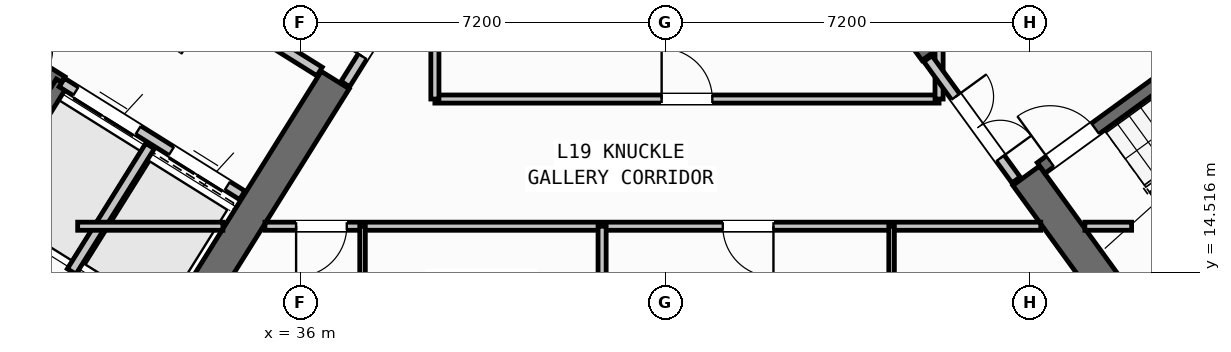
"""IFC4 building model, lengths in metres.
Left out: names, types, materials, properties, quantities, classifications, styles, units other than length and angle.
Written with IfcOpenShell. Run it as: python <this file> out.ifc"""

import sys

from ifc_helpers import new_model, si_unit, direction, frame, frame_2d, origin, place, context, subcontext, project, spatial, rectangle, extrude, source, transform, mapped, element, fill, save


model = new_model("IFC4")
c1 = context("Model", 3, precision=1e-05, world=origin(), true_north=direction((0.0, 1.0)))
c2 = subcontext(c1, "Body", "Model", "MODEL_VIEW")
j1 = project(units=[si_unit("LENGTHUNIT", "METRE"), si_unit("PLANEANGLEUNIT", "RADIAN")], contexts=[c1])
p1 = place(None, origin())
s1 = spatial("IfcSite", under=j1, at=p1, CompositionType="ELEMENT")
p2 = place(p1, origin())
s2 = spatial("IfcBuilding", under=s1, at=p2, CompositionType="ELEMENT")
p3 = place(p2, frame((0.0, 0.0, 76.5)))
s3 = spatial("IfcBuildingStorey", under=s2, at=p3, CompositionType="ELEMENT", Elevation=76.5)
p4 = place(p3, frame((33.409, 12.45, 0.0), z_axis=(0.0, 0.0, 1.0), x_axis=(-0.848051132073, 0.529914405721, 0.0)))
e1 = element("IfcWall", 1, at=p4, inside=s3, PredefinedType="SHEAR", context=c2, shape_type="SweptSolid", body=[
    extrude(rectangle(XDim=13.24, YDim=0.65, at=frame_2d((6.62, 0.0))), origin(), (0.0, 0.0, 1.0), 4.25),
])
p5 = place(p3, frame((36.683, 18.304, 0.0), z_axis=(0.0, 0.0, 1.0), x_axis=(-0.529899109053, -0.848060690178, 0.0)))
e2 = element("IfcWall", 2, at=p5, inside=s3, PredefinedType="SHEAR", context=c2, shape_type="SweptSolid", body=[
    extrude(rectangle(XDim=6.375, YDim=0.65, at=frame_2d((3.188, 0.0))), origin(), (0.0, 0.0, 1.0), 4.25),
])
p6 = place(p3, frame((52.318, 13.11, 0.0), z_axis=(0.0, 0.0, 1.0), x_axis=(0.809019445368, 0.587781878776, 0.0)))
e3 = element("IfcWall", 3, at=p6, inside=s3, PredefinedType="SHEAR", context=c2, shape_type="SweptSolid", body=[
    extrude(rectangle(XDim=12.44, YDim=0.65, at=frame_2d((6.22, 0.0))), origin(), (0.0, 0.0, 1.0), 4.25),
])
p7 = place(p3, frame((52.39, 13.564, 0.0), z_axis=(0.0, 0.0, 1.0), x_axis=(-0.58779688989, 0.809008539037, 0.0)))
e4 = element("IfcWall", 4, at=p7, inside=s3, PredefinedType="SHEAR", context=c2, shape_type="SweptSolid", body=[
    extrude(rectangle(XDim=3.525, YDim=0.65, at=frame_2d((1.763, 0.0))), origin(), (0.0, 0.0, 1.0), 4.25),
])
p8 = place(p3, frame((48.526, 18.884, 0.0), z_axis=(0.0, 0.0, 1.0), x_axis=(-0.58777996584, 0.809020835181, 0.0)))
e5 = element("IfcWall", 5, at=p8, inside=s3, PredefinedType="SHEAR", context=c2, shape_type="SweptSolid", body=[
    extrude(rectangle(XDim=6.375, YDim=0.65, at=frame_2d((3.188, 0.0))), origin(), (0.0, 0.0, 1.0), 4.25),
])
p9 = place(p3, frame((31.76, 12.183, 0.0), z_axis=(0.0, 0.0, 1.0), x_axis=(-0.848047074256, 0.529920899612, 0.0)))
e6 = element("IfcWall", 6, at=p9, inside=s3, PredefinedType="STANDARD", context=c2, shape_type="SweptSolid", body=[
    extrude(rectangle(XDim=30.652, YDim=0.32, at=frame_2d((15.326, 0.0))), origin(), (0.0, 0.0, 1.0), 4.25),
])
p10 = place(p9, frame((14.878, 0.0, 0.0)))
e7 = element("IfcOpeningElement", 7, at=p10, cuts=e6, PredefinedType="OPENING", context=c2, shape_type="SweptSolid", body=[
    extrude(rectangle(XDim=1.2, YDim=2.15, at=frame_2d((0.6, 1.075))), frame((0.0, 0.17, 0.0), z_axis=(0.0, -1.0, 0.0), x_axis=(1.0, 0.0, 0.0)), (0.0, 0.0, 1.0), 0.34),
])
p11 = place(p9, frame((1.74, 0.0, 0.7)))
e8 = element("IfcOpeningElement", 8, at=p11, cuts=e6, PredefinedType="OPENING", context=c2, shape_type="SweptSolid", body=[
    extrude(rectangle(XDim=2.6, YDim=2.0, at=frame_2d((1.3, 1.0))), frame((0.0, 0.17, 0.0), z_axis=(0.0, -1.0, 0.0), x_axis=(1.0, 0.0, 0.0)), (0.0, 0.0, 1.0), 0.34),
])
p12 = place(p9, frame((6.919, 0.0, 0.7)))
e9 = element("IfcOpeningElement", 9, at=p12, cuts=e6, PredefinedType="OPENING", context=c2, shape_type="SweptSolid", body=[
    extrude(rectangle(XDim=2.6, YDim=2.0, at=frame_2d((1.3, 1.0))), frame((0.0, 0.17, 0.0), z_axis=(0.0, -1.0, 0.0), x_axis=(1.0, 0.0, 0.0)), (0.0, 0.0, 1.0), 0.34),
])
p13 = place(p9, frame((19.451, 0.0, 0.85)))
e10 = element("IfcOpeningElement", 10, at=p13, cuts=e6, PredefinedType="OPENING", context=c2, shape_type="SweptSolid", body=[
    extrude(rectangle(XDim=1.6, YDim=1.8, at=frame_2d((0.8, 0.9))), frame((0.0, 0.17, 0.0), z_axis=(0.0, -1.0, 0.0), x_axis=(1.0, 0.0, 0.0)), (0.0, 0.0, 1.0), 0.34),
])
p14 = place(p9, frame((26.358, 0.0, 0.7)))
e11 = element("IfcOpeningElement", 11, at=p14, cuts=e6, PredefinedType="OPENING", context=c2, shape_type="SweptSolid", body=[
    extrude(rectangle(XDim=2.6, YDim=2.0, at=frame_2d((1.3, 1.0))), frame((0.0, 0.17, 0.0), z_axis=(0.0, -1.0, 0.0), x_axis=(1.0, 0.0, 0.0)), (0.0, 0.0, 1.0), 0.34),
])
p15 = place(p3, frame((31.28, 18.261, 0.0), z_axis=(0.0, 0.0, 1.0), x_axis=(-0.848051618787, 0.529913626805, 0.0)))
e12 = element("IfcWall", 12, at=p15, inside=s3, PredefinedType="SHEAR", context=c2, shape_type="SweptSolid", body=[
    extrude(rectangle(XDim=7.46, YDim=0.26, at=frame_2d((3.73, 0.0))), origin(), (0.0, 0.0, 1.0), 4.25),
])
p16 = place(p15, frame((0.36, 0.0, 0.0)))
e13 = element("IfcOpeningElement", 13, at=p16, cuts=e12, PredefinedType="OPENING", context=c2, shape_type="SweptSolid", body=[
    extrude(rectangle(XDim=0.86, YDim=2.05, at=frame_2d((0.43, 1.025))), frame((0.0, 0.14, 0.0), z_axis=(0.0, -1.0, 0.0), x_axis=(1.0, 0.0, 0.0)), (0.0, 0.0, 1.0), 0.28),
])
p17 = place(p3, frame((31.288, 18.256, 0.0), z_axis=(0.0, 0.0, 1.0), x_axis=(-0.529943379326, -0.848033026897, 0.0)))
e14 = element("IfcWall", 14, at=p17, inside=s3, PredefinedType="SHEAR", context=c2, shape_type="SweptSolid", body=[
    extrude(rectangle(XDim=3.16, YDim=0.26, at=frame_2d((1.58, 0.0))), origin(), (0.0, 0.0, 1.0), 4.25),
])
p18 = place(p3, frame((34.848, 16.031, 0.0), z_axis=(0.0, 0.0, 1.0), x_axis=(-0.848044042236, 0.529925751807, 0.0)))
e15 = element("IfcWall", 15, at=p18, inside=s3, PredefinedType="STANDARD", context=c2, shape_type="SweptSolid", body=[
    extrude(rectangle(XDim=4.198, YDim=0.2, at=frame_2d((2.099, 0.0))), origin(), (0.0, 0.0, 1.0), 4.24),
])
p19 = place(p18, frame((0.348, 0.0, 0.0)))
e16 = element("IfcOpeningElement", 16, at=p19, cuts=e15, PredefinedType="OPENING", context=c2, shape_type="SweptSolid", body=[
    extrude(rectangle(XDim=1.3, YDim=2.2, at=frame_2d((0.65, 1.1))), frame((0.0, 0.11, 0.0), z_axis=(0.0, -1.0, 0.0), x_axis=(1.0, 0.0, 0.0)), (0.0, 0.0, 1.0), 0.22),
])
p20 = place(p18, frame((2.423, 0.0, 0.0)))
e17 = element("IfcOpeningElement", 17, at=p20, cuts=e15, PredefinedType="OPENING", context=c2, shape_type="SweptSolid", body=[
    extrude(rectangle(XDim=1.45, YDim=2.25, at=frame_2d((0.725, 1.125))), frame((0.0, 0.11, 0.0), z_axis=(0.0, -1.0, 0.0), x_axis=(1.0, 0.0, 0.0)), (0.0, 0.0, 1.0), 0.22),
])
p21 = place(p3, frame((36.374, 18.474, 0.0), z_axis=(0.0, 0.0, 1.0), x_axis=(-0.848051071577, 0.529914502535, 0.0)))
e18 = element("IfcWall", 18, at=p21, inside=s3, PredefinedType="STANDARD", context=c2, shape_type="SweptSolid", body=[
    extrude(rectangle(XDim=5.718, YDim=0.2, at=frame_2d((2.859, 0.0))), origin(), (0.0, 0.0, 1.0), 4.24),
])
p22 = place(p21, frame((2.498, 0.0, 0.0)))
e19 = element("IfcOpeningElement", 19, at=p22, cuts=e18, PredefinedType="OPENING", context=c2, shape_type="SweptSolid", body=[
    extrude(rectangle(XDim=1.15, YDim=2.1, at=frame_2d((0.575, 1.05))), frame((0.0, 0.11, 0.0), z_axis=(0.0, -1.0, 0.0), x_axis=(1.0, 0.0, 0.0)), (0.0, 0.0, 1.0), 0.22),
])
p23 = place(p3, frame((33.029, 17.003, 0.0), z_axis=(0.0, 0.0, 1.0), x_axis=(-0.529916267533, -0.848049968695, 0.0)))
e20 = element("IfcWall", 20, at=p23, inside=s3, PredefinedType="STANDARD", context=c2, shape_type="SweptSolid", body=[
    extrude(rectangle(XDim=2.92, YDim=0.2, at=frame_2d((1.46, 0.0))), origin(), (0.0, 0.0, 1.0), 4.24),
])
p24 = place(p3, frame((52.472, 14.013, 0.0), z_axis=(0.0, 0.0, 1.0), x_axis=(0.809028366311, 0.587769599847, 0.0)))
e21 = element("IfcWall", 21, at=p24, inside=s3, PredefinedType="SHEAR", context=c2, shape_type="SweptSolid", body=[
    extrude(rectangle(XDim=7.33, YDim=0.26, at=frame_2d((3.665, 0.0))), origin(), (0.0, 0.0, 1.0), 4.25),
])
p25 = place(p3, frame((50.615, 16.57, 0.0), z_axis=(0.0, 0.0, 1.0), x_axis=(0.809028366311, 0.587769599847, 0.0)))
e22 = element("IfcWall", 22, at=p25, inside=s3, PredefinedType="SHEAR", context=c2, shape_type="SweptSolid", body=[
    extrude(rectangle(XDim=7.33, YDim=0.26, at=frame_2d((3.665, 0.0))), origin(), (0.0, 0.0, 1.0), 4.25),
])
p26 = place(p25, frame((0.22, 0.0, 0.0)))
e23 = element("IfcOpeningElement", 23, at=p26, cuts=e22, PredefinedType="OPENING", context=c2, shape_type="SweptSolid", body=[
    extrude(rectangle(XDim=1.1, YDim=2.1, at=frame_2d((0.55, 1.05))), frame((0.0, 0.14, 0.0), z_axis=(0.0, -1.0, 0.0), x_axis=(1.0, 0.0, 0.0)), (0.0, 0.0, 1.0), 0.28),
])
p27 = place(p3, frame((38.451, 20.737, 0.0), z_axis=(0.0, 0.0, 1.0), x_axis=(-0.529924799939, -0.848044637038, 0.0)))
e24 = element("IfcWall", 24, at=p27, inside=s3, PredefinedType="STANDARD", context=c2, shape_type="SweptSolid", body=[
    extrude(rectangle(XDim=2.96, YDim=0.2, at=frame_2d((1.48, 0.0))), origin(), (0.0, 0.0, 1.0), 4.24),
])
p28 = place(p27, frame((1.46, 0.0, 0.0)))
e25 = element("IfcOpeningElement", 25, at=p28, cuts=e24, PredefinedType="OPENING", context=c2, shape_type="SweptSolid", body=[
    extrude(rectangle(XDim=0.86, YDim=2.05, at=frame_2d((0.43, 1.025))), frame((0.0, 0.11, 0.0), z_axis=(0.0, -1.0, 0.0), x_axis=(1.0, 0.0, 0.0)), (0.0, 0.0, 1.0), 0.22),
])
p29 = place(p3, frame((31.6, 15.42, 0.0), z_axis=(0.0, 0.0, 1.0), x_axis=(1.0, 0.0, 0.0)))
e26 = element("IfcWall", 26, at=p29, inside=s3, PredefinedType="PARTITIONING", context=c2, shape_type="SweptSolid", body=[
    extrude(rectangle(XDim=2.866, YDim=0.16, at=frame_2d((1.433, 0.0))), origin(), (0.0, 0.0, 1.0), 4.24),
])
p30 = place(p3, frame((35.296, 15.42, 0.0), z_axis=(0.0, 0.0, 1.0), x_axis=(1.0, 0.0, 0.0)))
e27 = element("IfcWall", 27, at=p30, inside=s3, PredefinedType="PARTITIONING", context=c2, shape_type="SweptSolid", body=[
    extrude(rectangle(XDim=15.311, YDim=0.16, at=frame_2d((7.655, 0.0))), origin(), (0.0, 0.0, 1.0), 4.24),
])
p31 = place(p30, frame((0.615, 0.0, 0.0)))
e28 = element("IfcOpeningElement", 28, at=p31, cuts=e27, PredefinedType="OPENING", context=c2, shape_type="SweptSolid", body=[
    extrude(rectangle(XDim=1.0, YDim=2.1, at=frame_2d((0.5, 1.05))), frame((0.0, 0.09, 0.0), z_axis=(0.0, -1.0, 0.0), x_axis=(1.0, 0.0, 0.0)), (0.0, 0.0, 1.0), 0.18),
])
p32 = place(p30, frame((9.035, 0.0, 0.0)))
e29 = element("IfcOpeningElement", 29, at=p32, cuts=e27, PredefinedType="OPENING", context=c2, shape_type="SweptSolid", body=[
    extrude(rectangle(XDim=1.0, YDim=2.1, at=frame_2d((0.5, 1.05))), frame((0.0, 0.09, 0.0), z_axis=(0.0, -1.0, 0.0), x_axis=(1.0, 0.0, 0.0)), (0.0, 0.0, 1.0), 0.18),
])
p33 = place(p3, frame((51.477, 15.42, 0.0), z_axis=(0.0, 0.0, 1.0), x_axis=(1.0, 0.0, 0.0)))
e30 = element("IfcWall", 30, at=p33, inside=s3, PredefinedType="PARTITIONING", context=c2, shape_type="SweptSolid", body=[
    extrude(rectangle(XDim=0.923, YDim=0.16, at=frame_2d((0.461, 0.0))), origin(), (0.0, 0.0, 1.0), 4.24),
])
p34 = place(p3, frame((38.65, 17.93, 0.0), z_axis=(0.0, 0.0, 1.0), x_axis=(1.0, 0.0, 0.0)))
e31 = element("IfcWall", 31, at=p34, inside=s3, PredefinedType="PARTITIONING", context=c2, shape_type="SweptSolid", body=[
    extrude(rectangle(XDim=9.95, YDim=0.16, at=frame_2d((4.975, 0.0))), origin(), (0.0, 0.0, 1.0), 4.24),
])
p35 = place(p34, frame((4.475, 0.0, 0.0)))
e32 = element("IfcOpeningElement", 32, at=p35, cuts=e31, PredefinedType="OPENING", context=c2, shape_type="SweptSolid", body=[
    extrude(rectangle(XDim=1.0, YDim=2.1, at=frame_2d((0.5, 1.05))), frame((0.0, 0.09, 0.0), z_axis=(0.0, -1.0, 0.0), x_axis=(1.0, 0.0, 0.0)), (0.0, 0.0, 1.0), 0.18),
])
p36 = place(p3, frame((38.65, 17.93, 0.0), z_axis=(0.0, 0.0, 1.0), x_axis=(0.0, 1.0, 0.0)))
e33 = element("IfcWall", 33, at=p36, inside=s3, PredefinedType="PARTITIONING", context=c2, shape_type="SweptSolid", body=[
    extrude(rectangle(XDim=2.857, YDim=0.16, at=frame_2d((1.428, 0.0))), origin(), (0.0, 0.0, 1.0), 4.24),
])
p37 = place(p3, frame((48.6, 17.93, 0.0), z_axis=(0.0, 0.0, 1.0), x_axis=(0.0, 1.0, 0.0)))
e34 = element("IfcWall", 34, at=p37, inside=s3, PredefinedType="PARTITIONING", context=c2, shape_type="SweptSolid", body=[
    extrude(rectangle(XDim=0.993, YDim=0.16, at=frame_2d((0.496, 0.0))), origin(), (0.0, 0.0, 1.0), 4.24),
])
p38 = place(p3, frame((50.119, 16.333, 0.0), z_axis=(0.0, 0.0, 1.0), x_axis=(-0.587749856981, 0.809042709391, 0.0)))
e35 = element("IfcWall", 35, at=p38, inside=s3, PredefinedType="STANDARD", context=c2, shape_type="SweptSolid", body=[
    extrude(rectangle(XDim=2.96, YDim=0.2, at=frame_2d((1.48, 0.0))), origin(), (0.0, 0.0, 1.0), 4.24),
])
p39 = place(p38, frame((0.53, 0.0, 0.0)))
e36 = element("IfcOpeningElement", 36, at=p39, cuts=e35, PredefinedType="OPENING", context=c2, shape_type="SweptSolid", body=[
    extrude(rectangle(XDim=1.5, YDim=2.15, at=frame_2d((0.75, 1.075))), frame((0.0, 0.11, 0.0), z_axis=(0.0, -1.0, 0.0), x_axis=(1.0, 0.0, 0.0)), (0.0, 0.0, 1.0), 0.22),
])
p40 = place(p3, frame((41.95, 1.96, 0.0), z_axis=(0.0, 0.0, 1.0), x_axis=(0.0, 1.0, 0.0)))
e37 = element("IfcWall", 37, at=p40, inside=s3, PredefinedType="PARTITIONING", context=c2, shape_type="SweptSolid", body=[
    extrude(rectangle(XDim=13.46, YDim=0.16, at=frame_2d((6.73, 0.0))), origin(), (0.0, 0.0, 1.0), 4.24),
])
p41 = place(p3, frame((37.222, 1.96, 0.0), z_axis=(0.0, 0.0, 1.0), x_axis=(0.0, 1.0, 0.0)))
e38 = element("IfcWall", 38, at=p41, inside=s3, PredefinedType="PARTITIONING", context=c2, shape_type="SweptSolid", body=[
    extrude(rectangle(XDim=13.46, YDim=0.11, at=frame_2d((6.73, 0.0))), origin(), (0.0, 0.0, 1.0), 4.24),
])
p42 = place(p41, frame((5.2, 0.0, 0.0)))
e39 = element("IfcOpeningElement", 39, at=p42, cuts=e38, PredefinedType="OPENING", context=c2, shape_type="SweptSolid", body=[
    extrude(rectangle(XDim=0.92, YDim=2.08, at=frame_2d((0.46, 1.04))), frame((0.0, 0.065, 0.0), z_axis=(0.0, -1.0, 0.0), x_axis=(1.0, 0.0, 0.0)), (0.0, 0.0, 1.0), 0.13),
])
p43 = place(p41, frame((10.45, 0.0, 0.0)))
e40 = element("IfcOpeningElement", 40, at=p43, cuts=e38, PredefinedType="OPENING", context=c2, shape_type="SweptSolid", body=[
    extrude(rectangle(XDim=0.88, YDim=2.08, at=frame_2d((0.44, 1.04))), frame((0.0, 0.065, 0.0), z_axis=(0.0, -1.0, 0.0), x_axis=(1.0, 0.0, 0.0)), (0.0, 0.0, 1.0), 0.13),
])
p44 = place(p3, frame((47.663, 1.96, 0.0), z_axis=(0.0, 0.0, 1.0), x_axis=(0.0, 1.0, 0.0)))
e41 = element("IfcWall", 41, at=p44, inside=s3, PredefinedType="PARTITIONING", context=c2, shape_type="SweptSolid", body=[
    extrude(rectangle(XDim=13.46, YDim=0.11, at=frame_2d((6.73, 0.0))), origin(), (0.0, 0.0, 1.0), 4.24),
])
p45 = place(p44, frame((6.3, 0.0, 0.0)))
e42 = element("IfcOpeningElement", 42, at=p45, cuts=e41, PredefinedType="OPENING", context=c2, shape_type="SweptSolid", body=[
    extrude(rectangle(XDim=0.92, YDim=2.08, at=frame_2d((0.46, 1.04))), frame((0.0, 0.065, 0.0), z_axis=(0.0, -1.0, 0.0), x_axis=(1.0, 0.0, 0.0)), (0.0, 0.0, 1.0), 0.13),
])
p46 = place(p44, frame((11.1, 0.0, 0.0)))
e43 = element("IfcOpeningElement", 43, at=p46, cuts=e41, PredefinedType="OPENING", context=c2, shape_type="SweptSolid", body=[
    extrude(rectangle(XDim=0.88, YDim=2.08, at=frame_2d((0.44, 1.04))), frame((0.0, 0.065, 0.0), z_axis=(0.0, -1.0, 0.0), x_axis=(1.0, 0.0, 0.0)), (0.0, 0.0, 1.0), 0.13),
])
m1 = source(origin(), c2, "Body", "SweptSolid", [
    extrude(rectangle(XDim=1.3, YDim=2.2, at=frame_2d((0.65, 1.1))), frame((0.0, 0.025, 0.0), z_axis=(0.0, -1.0, 0.0), x_axis=(1.0, 0.0, 0.0)), (0.0, 0.0, 1.0), 0.05),
])
p47 = place(p19, origin())
e44 = element("IfcDoor", 44, at=p47, inside=s3, OperationType="DOUBLE_DOOR_SLIDING", PredefinedType="DOOR", context=c2, shape_type="MappedRepresentation", body=[
    mapped(m1, transform((0.0, 0.0, 0.0), scale=1.0)),
])
fill(e16, e44)
m2 = source(origin(), c2, "Body", "SweptSolid", [
    extrude(rectangle(XDim=1.45, YDim=2.25, at=frame_2d((0.725, 1.125))), frame((0.0, 0.025, 0.0), z_axis=(0.0, -1.0, 0.0), x_axis=(1.0, 0.0, 0.0)), (0.0, 0.0, 1.0), 0.05),
])
p48 = place(p20, origin())
e45 = element("IfcDoor", 45, at=p48, inside=s3, OperationType="DOUBLE_DOOR_SLIDING", PredefinedType="DOOR", context=c2, shape_type="MappedRepresentation", body=[
    mapped(m2, transform((0.0, 0.0, 0.0), scale=1.0)),
])
fill(e17, e45)
m3 = source(origin(), c2, "Body", "SweptSolid", [
    extrude(rectangle(XDim=1.1, YDim=2.1, at=frame_2d((0.55, 1.05))), frame((0.0, 0.025, 0.0), z_axis=(0.0, -1.0, 0.0), x_axis=(1.0, 0.0, 0.0)), (0.0, 0.0, 1.0), 0.05),
])
p49 = place(p26, origin())
e46 = element("IfcDoor", 46, at=p49, inside=s3, OperationType="SINGLE_SWING_LEFT", PredefinedType="DOOR", context=c2, shape_type="MappedRepresentation", body=[
    mapped(m3, transform((0.0, 0.0, 0.0), scale=1.0)),
])
fill(e23, e46)
m4 = source(origin(), c2, "Body", "SweptSolid", [
    extrude(rectangle(XDim=1.0, YDim=2.1, at=frame_2d((0.5, 1.05))), frame((0.0, 0.025, 0.0), z_axis=(0.0, -1.0, 0.0), x_axis=(1.0, 0.0, 0.0)), (0.0, 0.0, 1.0), 0.05),
])
p50 = place(p35, origin())
e47 = element("IfcDoor", 47, at=p50, inside=s3, OperationType="SINGLE_SWING_LEFT", PredefinedType="DOOR", context=c2, shape_type="MappedRepresentation", body=[
    mapped(m4, transform((0.0, 0.0, 0.0), scale=1.0)),
])
fill(e32, e47)
m5 = source(origin(), c2, "Body", "SweptSolid", [
    extrude(rectangle(XDim=0.86, YDim=2.05, at=frame_2d((0.43, 1.025))), frame((0.0, 0.025, 0.0), z_axis=(0.0, -1.0, 0.0), x_axis=(1.0, 0.0, 0.0)), (0.0, 0.0, 1.0), 0.05),
])
p51 = place(p28, frame((0.86, 0.0, 0.0), z_axis=(0.0, 0.0, 1.0), x_axis=(-1.0, 0.0, 0.0)))
e48 = element("IfcDoor", 48, at=p51, inside=s3, OperationType="SINGLE_SWING_LEFT", PredefinedType="DOOR", context=c2, shape_type="MappedRepresentation", body=[
    mapped(m5, transform((0.0, 0.0, 0.0), scale=1.0)),
])
fill(e25, e48)
m6 = source(origin(), c2, "Body", "SweptSolid", [
    extrude(rectangle(XDim=1.5, YDim=2.15, at=frame_2d((0.75, 1.075))), frame((0.0, 0.025, 0.0), z_axis=(0.0, -1.0, 0.0), x_axis=(1.0, 0.0, 0.0)), (0.0, 0.0, 1.0), 0.05),
])
p52 = place(p39, frame((1.5, 0.0, 0.0), z_axis=(0.0, 0.0, 1.0), x_axis=(-1.0, 0.0, 0.0)))
e49 = element("IfcDoor", 49, at=p52, inside=s3, OperationType="DOUBLE_DOOR_SINGLE_SWING", PredefinedType="DOOR", context=c2, shape_type="MappedRepresentation", body=[
    mapped(m6, transform((0.0, 0.0, 0.0), scale=1.0)),
])
fill(e36, e49)
p53 = place(p31, frame((1.0, 0.0, 0.0), z_axis=(0.0, 0.0, 1.0), x_axis=(-1.0, 0.0, 0.0)))
e50 = element("IfcDoor", 50, at=p53, inside=s3, OperationType="SINGLE_SWING_RIGHT", PredefinedType="DOOR", context=c2, shape_type="MappedRepresentation", body=[
    mapped(m4, transform((0.0, 0.0, 0.0), scale=1.0)),
])
fill(e28, e50)
p54 = place(p32, frame((1.0, 0.0, 0.0), z_axis=(0.0, 0.0, 1.0), x_axis=(-1.0, 0.0, 0.0)))
e51 = element("IfcDoor", 51, at=p54, inside=s3, OperationType="SINGLE_SWING_LEFT", PredefinedType="DOOR", context=c2, shape_type="MappedRepresentation", body=[
    mapped(m4, transform((0.0, 0.0, 0.0), scale=1.0)),
])
fill(e29, e51)
save(model, sys.argv[1])
